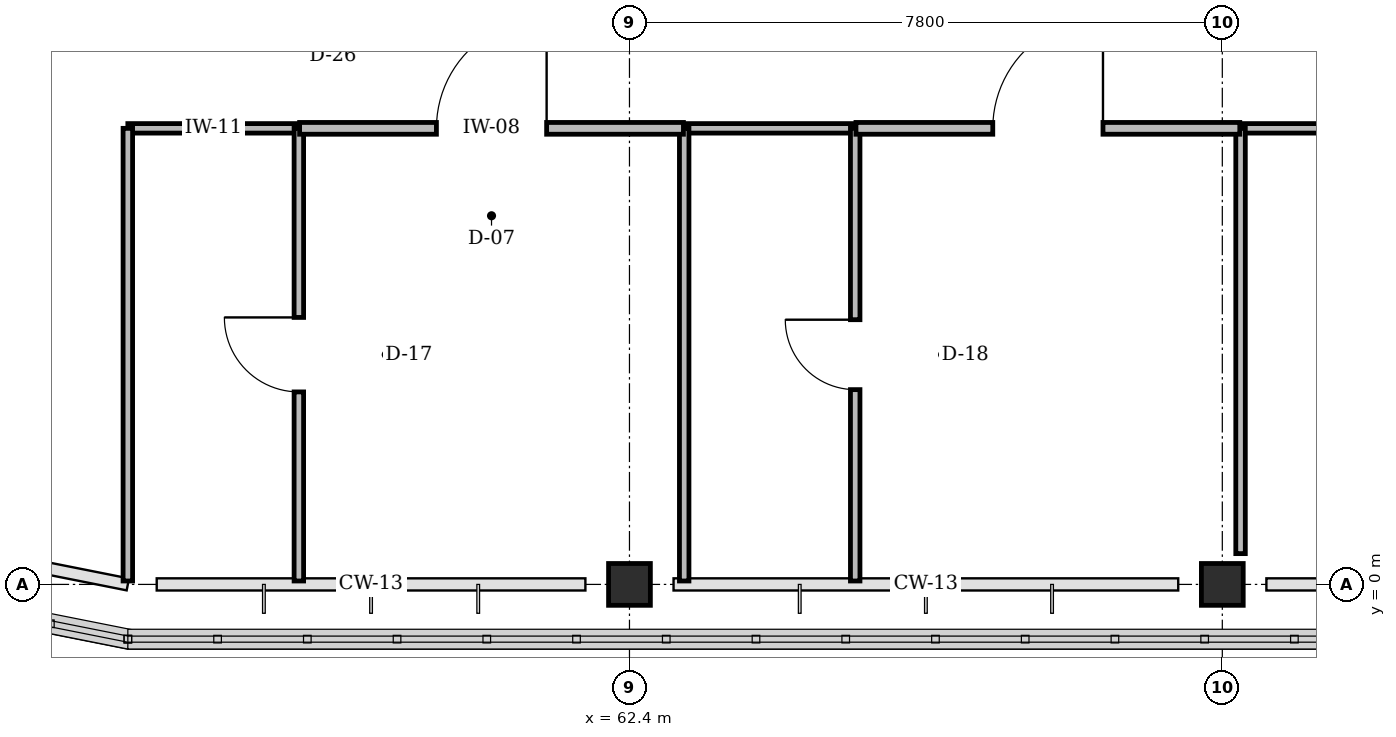
"""IFC4 building model, lengths in metres.
Left out: names, types, materials, properties, quantities, classifications, styles, units other than length and angle.
Written with IfcOpenShell. Run it as: python <this file> out.ifc"""

import sys

from ifc_helpers import new_model, si_unit, direction, frame, frame_2d, origin, origin_2d, place, context, subcontext, project, spatial, rectangle, extrude, element, fill, save


model = new_model("IFC4")
c1 = context("Model", 3, precision=1e-05, world=origin(), true_north=direction((0.0, 1.0)))
c2 = subcontext(c1, "Body", "Model", "MODEL_VIEW")
j1 = project(units=[si_unit("LENGTHUNIT", "METRE"), si_unit("PLANEANGLEUNIT", "RADIAN")], contexts=[c1])
p1 = place(None, origin())
s1 = spatial("IfcSite", under=j1, at=p1, CompositionType="ELEMENT")
p2 = place(p1, origin())
s2 = spatial("IfcBuilding", under=s1, at=p2, CompositionType="ELEMENT")
p3 = place(p2, frame((0.0, 0.0, 39.0)))
s3 = spatial("IfcBuildingStorey", under=s2, at=p3, CompositionType="ELEMENT", Elevation=39.0)
for number, where, z_axis, x_axis in (
    (1, (62.4, 0.0, 0.0), (0.0, 0.0, 1.0), (1.0, 0.0, 0.0)),
    (2, (70.2, 0.0, 0.0), (0.0, 0.0, 1.0), (1.0, 0.0, 0.0)),
):
    element("IfcColumn", number, at=place(p3, frame(where, z_axis=z_axis, x_axis=x_axis)), inside=s3, PredefinedType="COLUMN", context=c2, shape_type="SweptSolid", body=[
        extrude(rectangle(XDim=0.55, YDim=0.55, at=origin_2d()), origin(), (0.0, 0.0, 1.0), 4.2),
    ])
p4 = place(p3, frame((55.8, 6.0, 0.0), z_axis=(0.0, 0.0, 1.0), x_axis=(1.0, 0.0, 0.0)))
e3 = element("IfcWall", 3, at=p4, inside=s3, PredefinedType="PARTITIONING", context=c2, shape_type="SweptSolid", body=[
    extrude(rectangle(XDim=2.25, YDim=0.125, at=frame_2d((1.125, 0.0))), origin(), (0.0, 0.0, 1.0), 3.9),
])
p5 = place(p3, frame((55.8, 0.045, 0.0), z_axis=(0.0, 0.0, 1.0), x_axis=(0.0, 1.0, 0.0)))
e4 = element("IfcWall", 4, at=p5, inside=s3, PredefinedType="PARTITIONING", context=c2, shape_type="SweptSolid", body=[
    extrude(rectangle(XDim=5.955, YDim=0.125, at=frame_2d((2.978, 0.0))), origin(), (0.0, 0.0, 1.0), 3.9),
])
p6 = place(p3, frame((58.05, 0.045, 0.0), z_axis=(0.0, 0.0, 1.0), x_axis=(0.0, 1.0, 0.0)))
e5 = element("IfcWall", 5, at=p6, inside=s3, PredefinedType="PARTITIONING", context=c2, shape_type="SweptSolid", body=[
    extrude(rectangle(XDim=5.955, YDim=0.125, at=frame_2d((2.978, 0.0))), origin(), (0.0, 0.0, 1.0), 3.9),
])
p7 = place(p6, frame((2.488, 0.0, 0.0)))
e6 = element("IfcOpeningElement", 6, at=p7, cuts=e5, PredefinedType="OPENING", context=c2, shape_type="SweptSolid", body=[
    extrude(rectangle(XDim=0.98, YDim=2.1, at=frame_2d((0.49, 1.05))), frame((0.0, 0.073, 0.0), z_axis=(0.0, -1.0, 0.0), x_axis=(1.0, 0.0, 0.0)), (0.0, 0.0, 1.0), 0.145),
])
p8 = place(p3, frame((63.12, 6.0, 0.0), z_axis=(0.0, 0.0, 1.0), x_axis=(1.0, 0.0, 0.0)))
e7 = element("IfcWall", 7, at=p8, inside=s3, PredefinedType="PARTITIONING", context=c2, shape_type="SweptSolid", body=[
    extrude(rectangle(XDim=2.25, YDim=0.125, at=frame_2d((1.125, 0.0))), origin(), (0.0, 0.0, 1.0), 3.9),
])
p9 = place(p3, frame((63.12, 0.045, 0.0), z_axis=(0.0, 0.0, 1.0), x_axis=(0.0, 1.0, 0.0)))
e8 = element("IfcWall", 8, at=p9, inside=s3, PredefinedType="PARTITIONING", context=c2, shape_type="SweptSolid", body=[
    extrude(rectangle(XDim=5.955, YDim=0.125, at=frame_2d((2.978, 0.0))), origin(), (0.0, 0.0, 1.0), 3.9),
])
p10 = place(p3, frame((65.37, 0.045, 0.0), z_axis=(0.0, 0.0, 1.0), x_axis=(0.0, 1.0, 0.0)))
e9 = element("IfcWall", 9, at=p10, inside=s3, PredefinedType="PARTITIONING", context=c2, shape_type="SweptSolid", body=[
    extrude(rectangle(XDim=5.955, YDim=0.125, at=frame_2d((2.978, 0.0))), origin(), (0.0, 0.0, 1.0), 3.9),
])
p11 = place(p10, frame((2.518, 0.0, 0.0)))
e10 = element("IfcOpeningElement", 10, at=p11, cuts=e9, PredefinedType="OPENING", context=c2, shape_type="SweptSolid", body=[
    extrude(rectangle(XDim=0.92, YDim=2.1, at=frame_2d((0.46, 1.05))), frame((0.0, 0.073, 0.0), z_axis=(0.0, -1.0, 0.0), x_axis=(1.0, 0.0, 0.0)), (0.0, 0.0, 1.0), 0.145),
])
p12 = place(p3, frame((70.44, 6.0, 0.0), z_axis=(0.0, 0.0, 1.0), x_axis=(1.0, 0.0, 0.0)))
e11 = element("IfcWall", 11, at=p12, inside=s3, PredefinedType="PARTITIONING", context=c2, shape_type="SweptSolid", body=[
    extrude(rectangle(XDim=2.25, YDim=0.125, at=frame_2d((1.125, 0.0))), origin(), (0.0, 0.0, 1.0), 3.9),
])
p13 = place(p3, frame((70.44, 0.405, 0.0), z_axis=(0.0, 0.0, 1.0), x_axis=(0.0, 1.0, 0.0)))
e12 = element("IfcWall", 12, at=p13, inside=s3, PredefinedType="PARTITIONING", context=c2, shape_type="SweptSolid", body=[
    extrude(rectangle(XDim=5.595, YDim=0.125, at=frame_2d((2.797, 0.0))), origin(), (0.0, 0.0, 1.0), 3.355),
])
p14 = place(p3, frame((58.06, 6.0, 0.0), z_axis=(0.0, 0.0, 1.0), x_axis=(1.0, 0.0, 0.0)))
e13 = element("IfcWall", 13, at=p14, inside=s3, PredefinedType="PARTITIONING", context=c2, shape_type="SweptSolid", body=[
    extrude(rectangle(XDim=5.05, YDim=0.155, at=frame_2d((2.525, 0.0))), origin(), (0.0, 0.0, 1.0), 3.9),
])
p15 = place(p14, frame((1.8, 0.0, 0.0)))
e14 = element("IfcOpeningElement", 14, at=p15, cuts=e13, PredefinedType="OPENING", context=c2, shape_type="SweptSolid", body=[
    extrude(rectangle(XDim=1.45, YDim=2.2, at=frame_2d((0.725, 1.1))), frame((0.0, 0.087, 0.0), z_axis=(0.0, -1.0, 0.0), x_axis=(1.0, 0.0, 0.0)), (0.0, 0.0, 1.0), 0.175),
])
p16 = place(p3, frame((65.38, 6.0, 0.0), z_axis=(0.0, 0.0, 1.0), x_axis=(1.0, 0.0, 0.0)))
e15 = element("IfcWall", 15, at=p16, inside=s3, PredefinedType="PARTITIONING", context=c2, shape_type="SweptSolid", body=[
    extrude(rectangle(XDim=5.05, YDim=0.155, at=frame_2d((2.525, 0.0))), origin(), (0.0, 0.0, 1.0), 3.9),
])
p17 = place(p16, frame((1.8, 0.0, 0.0)))
e16 = element("IfcOpeningElement", 16, at=p17, cuts=e15, PredefinedType="OPENING", context=c2, shape_type="SweptSolid", body=[
    extrude(rectangle(XDim=1.45, YDim=2.2, at=frame_2d((0.725, 1.1))), frame((0.0, 0.087, 0.0), z_axis=(0.0, -1.0, 0.0), x_axis=(1.0, 0.0, 0.0)), (0.0, 0.0, 1.0), 0.175),
])
p18 = place(p7, origin())
e17 = element("IfcDoor", 17, at=p18, inside=s3, OperationType="SINGLE_SWING_RIGHT", PredefinedType="DOOR", context=c2, shape_type="SweptSolid", body=[
    extrude(rectangle(XDim=0.98, YDim=2.1, at=frame_2d((0.49, 1.05))), frame((0.0, 0.025, 0.0), z_axis=(0.0, -1.0, 0.0), x_axis=(1.0, 0.0, 0.0)), (0.0, 0.0, 1.0), 0.05),
])
fill(e6, e17)
p19 = place(p11, origin())
e18 = element("IfcDoor", 18, at=p19, inside=s3, OperationType="SINGLE_SWING_RIGHT", PredefinedType="DOOR", context=c2, shape_type="SweptSolid", body=[
    extrude(rectangle(XDim=0.92, YDim=2.1, at=frame_2d((0.46, 1.05))), frame((0.0, 0.025, 0.0), z_axis=(0.0, -1.0, 0.0), x_axis=(1.0, 0.0, 0.0)), (0.0, 0.0, 1.0), 0.05),
])
fill(e10, e18)
p20 = place(p15, origin())
e19 = element("IfcDoor", 19, at=p20, inside=s3, OperationType="SINGLE_SWING_RIGHT", PredefinedType="DOOR", context=c2, shape_type="SweptSolid", body=[
    extrude(rectangle(XDim=1.45, YDim=2.2, at=frame_2d((0.725, 1.1))), frame((0.0, 0.025, 0.0), z_axis=(0.0, -1.0, 0.0), x_axis=(1.0, 0.0, 0.0)), (0.0, 0.0, 1.0), 0.05),
])
fill(e14, e19)
p21 = place(p17, origin())
e20 = element("IfcDoor", 20, at=p21, inside=s3, OperationType="SINGLE_SWING_RIGHT", PredefinedType="DOOR", context=c2, shape_type="SweptSolid", body=[
    extrude(rectangle(XDim=1.45, YDim=2.2, at=frame_2d((0.725, 1.1))), frame((0.0, 0.025, 0.0), z_axis=(0.0, -1.0, 0.0), x_axis=(1.0, 0.0, 0.0)), (0.0, 0.0, 1.0), 0.05),
])
fill(e16, e20)
save(model, sys.argv[1])
